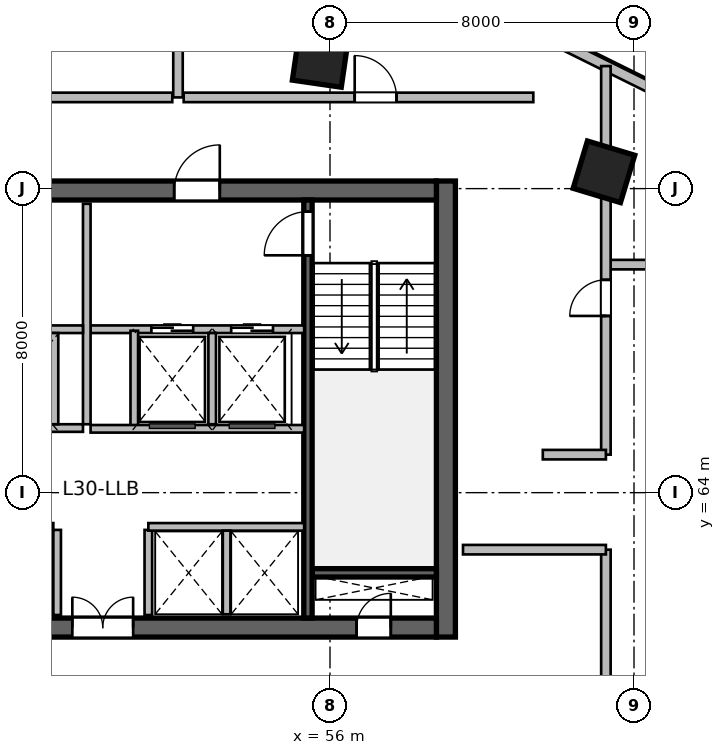
"""IFC4 building model, lengths in metres.
Left out: names, types, materials, properties, quantities, classifications, styles, units other than length and angle.
Written with IfcOpenShell. Run it as: python <this file> out.ifc"""

import sys

from ifc_helpers import new_model, si_unit, direction, frame, frame_2d, origin, origin_2d, place, context, subcontext, project, spatial, rectangle, extrude, source, transform, mapped, element, fill, save


model = new_model("IFC4")
c1 = context("Model", 3, precision=1e-05, world=origin(), true_north=direction((0.0, 1.0)))
c2 = subcontext(c1, "Body", "Model", "MODEL_VIEW")
j1 = project(units=[si_unit("LENGTHUNIT", "METRE"), si_unit("PLANEANGLEUNIT", "RADIAN")], contexts=[c1])
p1 = place(None, origin())
s1 = spatial("IfcSite", under=j1, at=p1, CompositionType="ELEMENT")
p2 = place(p1, origin())
s2 = spatial("IfcBuilding", under=s1, at=p2, CompositionType="ELEMENT")
p3 = place(p2, frame((0.0, 0.0, 127.2)))
s3 = spatial("IfcBuildingStorey", under=s2, at=p3, CompositionType="ELEMENT", Elevation=127.2)
m1 = source(origin(), c2, "Body", "SweptSolid", [
    extrude(rectangle(XDim=12.0, YDim=0.5, at=frame_2d((6.0, 0.0))), origin(), (0.0, 0.0, 1.0), 3.9),
])
p4 = place(p3, frame((59.05, 60.2, 0.0), z_axis=(0.0, 0.0, 1.0), x_axis=(0.0, 1.0, 0.0)))
e1 = element("IfcWall", 1, at=p4, inside=s3, PredefinedType="SHEAR", context=c2, shape_type="MappedRepresentation", body=[
    mapped(m1, transform((0.0, 0.0, 0.0), scale=1.0)),
])
m2 = source(origin(), c2, "Body", "SweptSolid", [
    extrude(rectangle(XDim=21.6, YDim=0.5, at=frame_2d((10.8, 0.0))), origin(), (0.0, 0.0, 1.0), 3.9),
])
p5 = place(p3, frame((37.2, 60.45, 0.0), z_axis=(0.0, 0.0, 1.0), x_axis=(1.0, 0.0, 0.0)))
e2 = element("IfcWall", 2, at=p5, inside=s3, PredefinedType="SHEAR", context=c2, shape_type="MappedRepresentation", body=[
    mapped(m2, transform((0.0, 0.0, 0.0), scale=1.0)),
])
p6 = place(p5, frame((1.1, 0.0, 0.0)))
e3 = element("IfcOpeningElement", 3, at=p6, cuts=e2, PredefinedType="OPENING", context=c2, shape_type="SweptSolid", body=[
    extrude(rectangle(XDim=1.15, YDim=2.15, at=frame_2d((0.575, 1.075))), frame((0.0, 0.26, 0.0), z_axis=(0.0, -1.0, 0.0), x_axis=(1.0, 0.0, 0.0)), (0.0, 0.0, 1.0), 0.52),
])
p7 = place(p5, frame((19.5, 0.0, 0.0)))
e4 = element("IfcOpeningElement", 4, at=p7, cuts=e2, PredefinedType="OPENING", context=c2, shape_type="SweptSolid", body=[
    extrude(rectangle(XDim=0.9, YDim=2.1, at=frame_2d((0.45, 1.05))), frame((0.0, 0.26, 0.0), z_axis=(0.0, -1.0, 0.0), x_axis=(1.0, 0.0, 0.0)), (0.0, 0.0, 1.0), 0.52),
])
p8 = place(p5, frame((12.02, 0.0, 0.0)))
e5 = element("IfcOpeningElement", 5, at=p8, cuts=e2, PredefinedType="OPENING", context=c2, shape_type="SweptSolid", body=[
    extrude(rectangle(XDim=1.6, YDim=2.15, at=frame_2d((0.8, 1.075))), frame((0.0, 0.26, 0.0), z_axis=(0.0, -1.0, 0.0), x_axis=(1.0, 0.0, 0.0)), (0.0, 0.0, 1.0), 0.52),
])
p9 = place(p3, frame((37.2, 71.95, 0.0), z_axis=(0.0, 0.0, 1.0), x_axis=(1.0, 0.0, 0.0)))
e6 = element("IfcWall", 6, at=p9, inside=s3, PredefinedType="SHEAR", context=c2, shape_type="MappedRepresentation", body=[
    mapped(m2, transform((0.0, 0.0, 0.0), scale=1.0)),
])
p10 = place(p9, frame((1.2, 0.0, 0.0)))
e7 = element("IfcOpeningElement", 7, at=p10, cuts=e6, PredefinedType="OPENING", context=c2, shape_type="SweptSolid", body=[
    extrude(rectangle(XDim=0.9, YDim=2.1, at=frame_2d((0.45, 1.05))), frame((0.0, 0.26, 0.0), z_axis=(0.0, -1.0, 0.0), x_axis=(1.0, 0.0, 0.0)), (0.0, 0.0, 1.0), 0.52),
])
p11 = place(p9, frame((14.7, 0.0, 0.0)))
e8 = element("IfcOpeningElement", 8, at=p11, cuts=e6, PredefinedType="OPENING", context=c2, shape_type="SweptSolid", body=[
    extrude(rectangle(XDim=1.2, YDim=2.15, at=frame_2d((0.6, 1.075))), frame((0.0, 0.26, 0.0), z_axis=(0.0, -1.0, 0.0), x_axis=(1.0, 0.0, 0.0)), (0.0, 0.0, 1.0), 0.52),
])
p12 = place(p9, frame((4.15, 0.0, 0.0)))
e9 = element("IfcOpeningElement", 9, at=p12, cuts=e6, PredefinedType="OPENING", context=c2, shape_type="SweptSolid", body=[
    extrude(rectangle(XDim=1.3, YDim=2.15, at=frame_2d((0.65, 1.075))), frame((0.0, 0.26, 0.0), z_axis=(0.0, -1.0, 0.0), x_axis=(1.0, 0.0, 0.0)), (0.0, 0.0, 1.0), 0.52),
])
p13 = place(p9, frame((7.1, 0.0, 0.0)))
e10 = element("IfcOpeningElement", 10, at=p13, cuts=e6, PredefinedType="OPENING", context=c2, shape_type="SweptSolid", body=[
    extrude(rectangle(XDim=0.9, YDim=2.1, at=frame_2d((0.45, 1.05))), frame((0.0, 0.26, 0.0), z_axis=(0.0, -1.0, 0.0), x_axis=(1.0, 0.0, 0.0)), (0.0, 0.0, 1.0), 0.52),
])
m3 = source(origin(), c2, "Body", "SweptSolid", [
    extrude(rectangle(XDim=3.27, YDim=0.22, at=frame_2d((1.635, 0.0))), origin(), (0.0, 0.0, 1.0), 3.9),
])
p14 = place(p3, frame((55.53, 61.89, 0.0), z_axis=(0.0, 0.0, 1.0), x_axis=(1.0, 0.0, 0.0)))
e11 = element("IfcWall", 11, at=p14, inside=s3, PredefinedType="SHEAR", context=c2, shape_type="MappedRepresentation", body=[
    mapped(m3, transform((0.0, 0.0, 0.0), scale=1.0)),
])
m4 = source(origin(), c2, "Body", "SweptSolid", [
    extrude(rectangle(XDim=11.0, YDim=0.22, at=frame_2d((5.5, 0.0))), origin(), (0.0, 0.0, 1.0), 3.9),
])
p15 = place(p3, frame((55.42, 60.7, 0.0), z_axis=(0.0, 0.0, 1.0), x_axis=(0.0, 1.0, 0.0)))
e12 = element("IfcWall", 12, at=p15, inside=s3, PredefinedType="SHEAR", context=c2, shape_type="MappedRepresentation", body=[
    mapped(m4, transform((0.0, 0.0, 0.0), scale=1.0)),
])
p16 = place(p15, frame((9.545, 0.0, 0.0)))
e13 = element("IfcOpeningElement", 13, at=p16, cuts=e12, PredefinedType="OPENING", context=c2, shape_type="SweptSolid", body=[
    extrude(rectangle(XDim=1.15, YDim=2.15, at=frame_2d((0.575, 1.075))), frame((0.0, 0.12, 0.0), z_axis=(0.0, -1.0, 0.0), x_axis=(1.0, 0.0, 0.0)), (0.0, 0.0, 1.0), 0.24),
])
m5 = source(origin(), c2, "Body", "SweptSolid", [
    extrude(rectangle(XDim=1.3, YDim=1.3, at=origin_2d()), origin(), (0.0, 0.0, 1.0), 3.9),
])
for number, where, z_axis, x_axis in (
    (14, (55.747, 75.404, 0.0), (0.0, 0.0, 1.0), (0.143, 0.99, 0.0)),
    (15, (63.209, 72.442, 0.0), (0.0, 0.0, 1.0), (0.289, 0.957, 0.0)),
):
    element("IfcColumn", number, at=place(p3, frame(where, z_axis=z_axis, x_axis=x_axis)), inside=s3, PredefinedType="COLUMN", context=c2, shape_type="MappedRepresentation", body=[
        mapped(m5, transform((0.0, 0.0, 0.0), scale=1.0)),
    ])
m6 = source(origin(), c2, "Body", "SweptSolid", [
    extrude(rectangle(XDim=4.506, YDim=0.28, at=frame_2d((2.253, 0.0))), origin(), (0.0, 0.0, 1.0), 3.65),
])
p17 = place(p3, frame((60.714, 76.497, 0.0), z_axis=(0.0, 0.0, 1.0), x_axis=(0.89597155075, -0.444111450254, 0.0)))
e16 = element("IfcWall", 16, at=p17, inside=s3, PredefinedType="SOLIDWALL", context=c2, shape_type="MappedRepresentation", body=[
    mapped(m6, transform((0.0, 0.0, 0.0), scale=1.0)),
])
m7 = source(origin(), c2, "Body", "SweptSolid", [
    extrude(rectangle(XDim=2.24, YDim=0.2, at=frame_2d((1.12, 0.0))), origin(), (0.0, 0.0, 1.0), 3.65),
])
for number, where, z_axis, x_axis in (
    (17, (48.82, 60.78, 0.0), (0.0, 0.0, 1.0), (0.0, 1.0, 0.0)),
    (18, (51.22, 60.78, 0.0), (0.0, 0.0, 1.0), (0.0, 1.0, 0.0)),
):
    element("IfcWall", number, at=place(p3, frame(where, z_axis=z_axis, x_axis=x_axis)), inside=s3, PredefinedType="SOLIDWALL", context=c2, shape_type="MappedRepresentation", body=[
        mapped(m7, transform((0.0, 0.0, 0.0), scale=1.0)),
    ])
m8 = source(origin(), c2, "Body", "SweptSolid", [
    extrude(rectangle(XDim=5.62, YDim=0.2, at=frame_2d((2.81, 0.0))), origin(), (0.0, 0.0, 1.0), 3.65),
])
p18 = place(p3, frame((49.7, 68.3, 0.0), z_axis=(0.0, 0.0, 1.0), x_axis=(1.0, 0.0, 0.0)))
e19 = element("IfcWall", 19, at=p18, inside=s3, PredefinedType="SOLIDWALL", context=c2, shape_type="MappedRepresentation", body=[
    mapped(m8, transform((0.0, 0.0, 0.0), scale=1.0)),
])
p19 = place(p18, frame((1.6, 0.0, 0.0)))
e20 = element("IfcOpeningElement", 20, at=p19, cuts=e19, PredefinedType="OPENING", context=c2, shape_type="SweptSolid", body=[
    extrude(rectangle(XDim=1.1, YDim=2.15, at=frame_2d((0.55, 1.075))), frame((0.0, 0.11, 0.0), z_axis=(0.0, -1.0, 0.0), x_axis=(1.0, 0.0, 0.0)), (0.0, 0.0, 1.0), 0.22),
])
p20 = place(p18, frame((3.7, 0.0, 0.0)))
e21 = element("IfcOpeningElement", 21, at=p20, cuts=e19, PredefinedType="OPENING", context=c2, shape_type="SweptSolid", body=[
    extrude(rectangle(XDim=1.1, YDim=2.15, at=frame_2d((0.55, 1.075))), frame((0.0, 0.11, 0.0), z_axis=(0.0, -1.0, 0.0), x_axis=(1.0, 0.0, 0.0)), (0.0, 0.0, 1.0), 0.22),
])
m9 = source(origin(), c2, "Body", "SweptSolid", [
    extrude(rectangle(XDim=5.8, YDim=0.2, at=frame_2d((2.9, 0.0))), origin(), (0.0, 0.0, 1.0), 3.65),
])
p21 = place(p3, frame((49.6, 65.8, 0.0), z_axis=(0.0, 0.0, 1.0), x_axis=(0.0, 1.0, 0.0)))
e22 = element("IfcWall", 22, at=p21, inside=s3, PredefinedType="SOLIDWALL", context=c2, shape_type="MappedRepresentation", body=[
    mapped(m9, transform((0.0, 0.0, 0.0), scale=1.0)),
])
m10 = source(origin(), c2, "Body", "SweptSolid", [
    extrude(rectangle(XDim=2.58, YDim=0.2, at=frame_2d((1.29, 0.0))), origin(), (0.0, 0.0, 1.0), 3.65),
])
p22 = place(p3, frame((50.85, 65.68, 0.0), z_axis=(0.0, 0.0, 1.0), x_axis=(0.0, 1.0, 0.0)))
e23 = element("IfcWall", 23, at=p22, inside=s3, PredefinedType="SOLIDWALL", context=c2, shape_type="MappedRepresentation", body=[
    mapped(m10, transform((0.0, 0.0, 0.0), scale=1.0)),
])
m11 = source(origin(), c2, "Body", "SweptSolid", [
    extrude(rectangle(XDim=2.4, YDim=0.2, at=frame_2d((1.2, 0.0))), origin(), (0.0, 0.0, 1.0), 3.65),
])
p23 = place(p3, frame((52.9, 65.8, 0.0), z_axis=(0.0, 0.0, 1.0), x_axis=(0.0, 1.0, 0.0)))
e24 = element("IfcWall", 24, at=p23, inside=s3, PredefinedType="SOLIDWALL", context=c2, shape_type="MappedRepresentation", body=[
    mapped(m11, transform((0.0, 0.0, 0.0), scale=1.0)),
])
p24 = place(p3, frame((49.7, 65.68, 0.0), z_axis=(0.0, 0.0, 1.0), x_axis=(1.0, 0.0, 0.0)))
e25 = element("IfcWall", 25, at=p24, inside=s3, PredefinedType="SOLIDWALL", context=c2, shape_type="MappedRepresentation", body=[
    mapped(m8, transform((0.0, 0.0, 0.0), scale=1.0)),
])
m12 = source(origin(), c2, "Body", "SweptSolid", [
    extrude(rectangle(XDim=8.8, YDim=0.2, at=frame_2d((4.4, 0.0))), origin(), (0.0, 0.0, 1.0), 3.65),
])
p25 = place(p3, frame((40.7, 68.3, 0.0), z_axis=(0.0, 0.0, 1.0), x_axis=(1.0, 0.0, 0.0)))
e26 = element("IfcWall", 26, at=p25, inside=s3, PredefinedType="SOLIDWALL", context=c2, shape_type="MappedRepresentation", body=[
    mapped(m12, transform((0.0, 0.0, 0.0), scale=1.0)),
])
m13 = source(origin(), c2, "Body", "SweptSolid", [
    extrude(rectangle(XDim=8.02, YDim=0.2, at=frame_2d((4.01, 0.0))), origin(), (0.0, 0.0, 1.0), 3.65),
])
p26 = place(p3, frame((40.7, 63.1, 0.0), z_axis=(0.0, 0.0, 1.0), x_axis=(1.0, 0.0, 0.0)))
e27 = element("IfcWall", 27, at=p26, inside=s3, PredefinedType="SOLIDWALL", context=c2, shape_type="MappedRepresentation", body=[
    mapped(m13, transform((0.0, 0.0, 0.0), scale=1.0)),
])
p27 = place(p26, frame((3.4, 0.0, 0.0)))
e28 = element("IfcOpeningElement", 28, at=p27, cuts=e27, PredefinedType="OPENING", context=c2, shape_type="SweptSolid", body=[
    extrude(rectangle(XDim=0.95, YDim=2.15, at=frame_2d((0.475, 1.075))), frame((0.0, 0.11, 0.0), z_axis=(0.0, -1.0, 0.0), x_axis=(1.0, 0.0, 0.0)), (0.0, 0.0, 1.0), 0.22),
])
m14 = source(origin(), c2, "Body", "SweptSolid", [
    extrude(rectangle(XDim=4.1, YDim=0.2, at=frame_2d((2.05, 0.0))), origin(), (0.0, 0.0, 1.0), 3.65),
])
p28 = place(p3, frame((51.22, 63.1, 0.0), z_axis=(0.0, 0.0, 1.0), x_axis=(1.0, 0.0, 0.0)))
e29 = element("IfcWall", 29, at=p28, inside=s3, PredefinedType="SOLIDWALL", context=c2, shape_type="MappedRepresentation", body=[
    mapped(m14, transform((0.0, 0.0, 0.0), scale=1.0)),
])
m15 = source(origin(), c2, "Body", "SweptSolid", [
    extrude(rectangle(XDim=2.2, YDim=0.2, at=frame_2d((1.1, 0.0))), origin(), (0.0, 0.0, 1.0), 3.65),
])
p29 = place(p3, frame((53.28, 60.8, 0.0), z_axis=(0.0, 0.0, 1.0), x_axis=(0.0, 1.0, 0.0)))
e30 = element("IfcWall", 30, at=p29, inside=s3, PredefinedType="SOLIDWALL", context=c2, shape_type="MappedRepresentation", body=[
    mapped(m15, transform((0.0, 0.0, 0.0), scale=1.0)),
])
p30 = place(p3, frame((40.7, 65.7, 0.0), z_axis=(0.0, 0.0, 1.0), x_axis=(1.0, 0.0, 0.0)))
e31 = element("IfcWall", 31, at=p30, inside=s3, PredefinedType="SOLIDWALL", context=c2, shape_type="MappedRepresentation", body=[
    mapped(m12, transform((0.0, 0.0, 0.0), scale=1.0)),
])
p31 = place(p30, frame((0.72, 0.0, 0.0)))
e32 = element("IfcOpeningElement", 32, at=p31, cuts=e31, PredefinedType="OPENING", context=c2, shape_type="SweptSolid", body=[
    extrude(rectangle(XDim=1.0, YDim=2.15, at=frame_2d((0.5, 1.075))), frame((0.0, 0.11, 0.0), z_axis=(0.0, -1.0, 0.0), x_axis=(1.0, 0.0, 0.0)), (0.0, 0.0, 1.0), 0.22),
])
p32 = place(p30, frame((2.62, 0.0, 0.0)))
e33 = element("IfcOpeningElement", 33, at=p32, cuts=e31, PredefinedType="OPENING", context=c2, shape_type="SweptSolid", body=[
    extrude(rectangle(XDim=1.0, YDim=2.15, at=frame_2d((0.5, 1.075))), frame((0.0, 0.11, 0.0), z_axis=(0.0, -1.0, 0.0), x_axis=(1.0, 0.0, 0.0)), (0.0, 0.0, 1.0), 0.22),
])
p33 = place(p30, frame((4.55, 0.0, 0.0)))
e34 = element("IfcOpeningElement", 34, at=p33, cuts=e31, PredefinedType="OPENING", context=c2, shape_type="SweptSolid", body=[
    extrude(rectangle(XDim=1.0, YDim=2.15, at=frame_2d((0.5, 1.075))), frame((0.0, 0.11, 0.0), z_axis=(0.0, -1.0, 0.0), x_axis=(1.0, 0.0, 0.0)), (0.0, 0.0, 1.0), 0.22),
])
p34 = place(p30, frame((6.55, 0.0, 0.0)))
e35 = element("IfcOpeningElement", 35, at=p34, cuts=e31, PredefinedType="OPENING", context=c2, shape_type="SweptSolid", body=[
    extrude(rectangle(XDim=1.0, YDim=2.15, at=frame_2d((0.5, 1.075))), frame((0.0, 0.11, 0.0), z_axis=(0.0, -1.0, 0.0), x_axis=(1.0, 0.0, 0.0)), (0.0, 0.0, 1.0), 0.22),
])
p35 = place(p3, frame((48.75, 65.8, 0.0), z_axis=(0.0, 0.0, 1.0), x_axis=(0.0, 1.0, 0.0)))
e36 = element("IfcWall", 36, at=p35, inside=s3, PredefinedType="SOLIDWALL", context=c2, shape_type="MappedRepresentation", body=[
    mapped(m11, transform((0.0, 0.0, 0.0), scale=1.0)),
])
m16 = source(origin(), c2, "Body", "SweptSolid", [
    extrude(rectangle(XDim=2.5, YDim=0.25, at=frame_2d((1.25, 0.0))), origin(), (0.0, 0.0, 1.0), 3.65),
])
p36 = place(p3, frame((63.3, 70.0, 0.0), z_axis=(0.0, 0.0, 1.0), x_axis=(1.0, 0.0, 0.0)))
e37 = element("IfcWall", 37, at=p36, inside=s3, PredefinedType="PARTITIONING", context=c2, shape_type="MappedRepresentation", body=[
    mapped(m16, transform((0.0, 0.0, 0.0), scale=1.0)),
])
m17 = source(origin(), c2, "Body", "SweptSolid", [
    extrude(rectangle(XDim=7.7, YDim=0.25, at=frame_2d((3.85, 0.0))), origin(), (0.0, 0.0, 1.0), 3.65),
])
p37 = place(p3, frame((44.15, 74.4, 0.0), z_axis=(0.0, 0.0, 1.0), x_axis=(1.0, 0.0, 0.0)))
e38 = element("IfcWall", 38, at=p37, inside=s3, PredefinedType="PARTITIONING", context=c2, shape_type="MappedRepresentation", body=[
    mapped(m17, transform((0.0, 0.0, 0.0), scale=1.0)),
])
p38 = place(p37, frame((3.3, 0.0, 0.0)))
e39 = element("IfcOpeningElement", 39, at=p38, cuts=e38, PredefinedType="OPENING", context=c2, shape_type="SweptSolid", body=[
    extrude(rectangle(XDim=1.1, YDim=2.15, at=frame_2d((0.55, 1.075))), frame((0.0, 0.135, 0.0), z_axis=(0.0, -1.0, 0.0), x_axis=(1.0, 0.0, 0.0)), (0.0, 0.0, 1.0), 0.27),
])
m18 = source(origin(), c2, "Body", "SweptSolid", [
    extrude(rectangle(XDim=4.423, YDim=0.25, at=frame_2d((2.211, 0.0))), origin(), (0.0, 0.0, 1.0), 3.65),
])
p39 = place(p3, frame((52.0, 74.4, 0.0), z_axis=(0.0, 0.0, 1.0), x_axis=(0.0, 1.0, 0.0)))
e40 = element("IfcWall", 40, at=p39, inside=s3, PredefinedType="PARTITIONING", context=c2, shape_type="MappedRepresentation", body=[
    mapped(m18, transform((0.0, 0.0, 0.0), scale=1.0)),
])
m19 = source(origin(), c2, "Body", "SweptSolid", [
    extrude(rectangle(XDim=9.2, YDim=0.25, at=frame_2d((4.6, 0.0))), origin(), (0.0, 0.0, 1.0), 3.022),
])
p40 = place(p3, frame((52.15, 74.4, 0.0), z_axis=(0.0, 0.0, 1.0), x_axis=(1.0, 0.0, 0.0)))
e41 = element("IfcWall", 41, at=p40, inside=s3, PredefinedType="PARTITIONING", context=c2, shape_type="MappedRepresentation", body=[
    mapped(m19, transform((0.0, 0.0, 0.0), scale=1.0)),
])
p41 = place(p40, frame((4.5, 0.0, 0.0)))
e42 = element("IfcOpeningElement", 42, at=p41, cuts=e41, PredefinedType="OPENING", context=c2, shape_type="SweptSolid", body=[
    extrude(rectangle(XDim=1.1, YDim=2.15, at=frame_2d((0.55, 1.075))), frame((0.0, 0.135, 0.0), z_axis=(0.0, -1.0, 0.0), x_axis=(1.0, 0.0, 0.0)), (0.0, 0.0, 1.0), 0.27),
])
m20 = source(origin(), c2, "Body", "SweptSolid", [
    extrude(rectangle(XDim=16.706, YDim=0.25, at=frame_2d((8.353, 0.0))), origin(), (0.0, 0.0, 1.0), 2.942),
])
p42 = place(p3, frame((63.26, 45.794, 0.0), z_axis=(0.0, 0.0, 1.0), x_axis=(0.0, 1.0, 0.0)))
e43 = element("IfcWall", 43, at=p42, inside=s3, PredefinedType="PARTITIONING", context=c2, shape_type="MappedRepresentation", body=[
    mapped(m20, transform((0.0, 0.0, 0.0), scale=1.0)),
])
p43 = place(p42, frame((7.878, 0.0, 0.0)))
e44 = element("IfcOpeningElement", 44, at=p43, cuts=e43, PredefinedType="OPENING", context=c2, shape_type="SweptSolid", body=[
    extrude(rectangle(XDim=0.95, YDim=2.1, at=frame_2d((0.475, 1.05))), frame((0.0, 0.135, 0.0), z_axis=(0.0, -1.0, 0.0), x_axis=(1.0, 0.0, 0.0)), (0.0, 0.0, 1.0), 0.27),
])
m21 = source(origin(), c2, "Body", "SweptSolid", [
    extrude(rectangle(XDim=3.76, YDim=0.25, at=frame_2d((1.88, 0.0))), origin(), (0.0, 0.0, 1.0), 3.65),
])
p44 = place(p3, frame((59.5, 62.5, 0.0), z_axis=(0.0, 0.0, 1.0), x_axis=(1.0, 0.0, 0.0)))
e45 = element("IfcWall", 45, at=p44, inside=s3, PredefinedType="PARTITIONING", context=c2, shape_type="MappedRepresentation", body=[
    mapped(m21, transform((0.0, 0.0, 0.0), scale=1.0)),
])
m22 = source(origin(), c2, "Body", "SweptSolid", [
    extrude(rectangle(XDim=10.224, YDim=0.25, at=frame_2d((5.112, 0.0))), origin(), (0.0, 0.0, 1.0), 3.65),
])
p45 = place(p3, frame((63.26, 65.0, 0.0), z_axis=(0.0, 0.0, 1.0), x_axis=(0.0, 1.0, 0.0)))
e46 = element("IfcWall", 46, at=p45, inside=s3, PredefinedType="PARTITIONING", context=c2, shape_type="MappedRepresentation", body=[
    mapped(m22, transform((0.0, 0.0, 0.0), scale=1.0)),
])
p46 = place(p45, frame((3.65, 0.0, 0.0)))
e47 = element("IfcOpeningElement", 47, at=p46, cuts=e46, PredefinedType="OPENING", context=c2, shape_type="SweptSolid", body=[
    extrude(rectangle(XDim=0.95, YDim=2.1, at=frame_2d((0.475, 1.05))), frame((0.0, 0.135, 0.0), z_axis=(0.0, -1.0, 0.0), x_axis=(1.0, 0.0, 0.0)), (0.0, 0.0, 1.0), 0.27),
])
m23 = source(origin(), c2, "Body", "SweptSolid", [
    extrude(rectangle(XDim=1.66, YDim=0.25, at=frame_2d((0.83, 0.0))), origin(), (0.0, 0.0, 1.0), 3.65),
])
p47 = place(p3, frame((61.6, 65.0, 0.0), z_axis=(0.0, 0.0, 1.0), x_axis=(1.0, 0.0, 0.0)))
e48 = element("IfcWall", 48, at=p47, inside=s3, PredefinedType="PARTITIONING", context=c2, shape_type="MappedRepresentation", body=[
    mapped(m23, transform((0.0, 0.0, 0.0), scale=1.0)),
])
m24 = source(origin(), c2, "Body", "SweptSolid", [
    extrude(rectangle(XDim=0.9, YDim=2.1, at=frame_2d((0.45, 1.05))), frame((0.0, 0.025, 0.0), z_axis=(0.0, -1.0, 0.0), x_axis=(1.0, 0.0, 0.0)), (0.0, 0.0, 1.0), 0.05),
])
p48 = place(p7, origin())
e49 = element("IfcDoor", 49, at=p48, inside=s3, OperationType="SINGLE_SWING_RIGHT", PredefinedType="DOOR", context=c2, shape_type="MappedRepresentation", body=[
    mapped(m24, transform((0.0, 0.0, 0.0), scale=1.0)),
])
fill(e4, e49)
m25 = source(origin(), c2, "Body", "SweptSolid", [
    extrude(rectangle(XDim=1.15, YDim=2.15, at=frame_2d((0.575, 1.075))), frame((0.0, 0.025, 0.0), z_axis=(0.0, -1.0, 0.0), x_axis=(1.0, 0.0, 0.0)), (0.0, 0.0, 1.0), 0.05),
])
p49 = place(p16, origin())
e50 = element("IfcDoor", 50, at=p49, inside=s3, OperationType="SINGLE_SWING_LEFT", PredefinedType="DOOR", context=c2, shape_type="MappedRepresentation", body=[
    mapped(m25, transform((0.0, 0.0, 0.0), scale=1.0)),
])
fill(e13, e50)
m26 = source(origin(), c2, "Body", "SweptSolid", [
    extrude(rectangle(XDim=1.6, YDim=2.15, at=frame_2d((0.8, 1.075))), frame((0.0, 0.025, 0.0), z_axis=(0.0, -1.0, 0.0), x_axis=(1.0, 0.0, 0.0)), (0.0, 0.0, 1.0), 0.05),
])
p50 = place(p8, origin())
e51 = element("IfcDoor", 51, at=p50, inside=s3, OperationType="DOUBLE_DOOR_SINGLE_SWING", PredefinedType="DOOR", context=c2, shape_type="MappedRepresentation", body=[
    mapped(m26, transform((0.0, 0.0, 0.0), scale=1.0)),
])
fill(e5, e51)
m27 = source(origin(), c2, "Body", "SweptSolid", [
    extrude(rectangle(XDim=1.2, YDim=2.15, at=frame_2d((0.6, 1.075))), frame((0.0, 0.025, 0.0), z_axis=(0.0, -1.0, 0.0), x_axis=(1.0, 0.0, 0.0)), (0.0, 0.0, 1.0), 0.05),
])
p51 = place(p11, origin())
e52 = element("IfcDoor", 52, at=p51, inside=s3, OperationType="SINGLE_SWING_RIGHT", PredefinedType="DOOR", context=c2, shape_type="MappedRepresentation", body=[
    mapped(m27, transform((0.0, 0.0, 0.0), scale=1.0)),
])
fill(e8, e52)
m28 = source(origin(), c2, "Body", "SweptSolid", [
    extrude(rectangle(XDim=1.1, YDim=2.15, at=frame_2d((0.55, 1.075))), frame((0.0, 0.025, 0.0), z_axis=(0.0, -1.0, 0.0), x_axis=(1.0, 0.0, 0.0)), (0.0, 0.0, 1.0), 0.05),
])
p52 = place(p19, origin())
e53 = element("IfcDoor", 53, at=p52, inside=s3, OperationType="DOUBLE_DOOR_SLIDING", PredefinedType="DOOR", context=c2, shape_type="MappedRepresentation", body=[
    mapped(m28, transform((0.0, 0.0, 0.0), scale=1.0)),
])
fill(e20, e53)
p53 = place(p20, origin())
e54 = element("IfcDoor", 54, at=p53, inside=s3, OperationType="DOUBLE_DOOR_SLIDING", PredefinedType="DOOR", context=c2, shape_type="MappedRepresentation", body=[
    mapped(m28, transform((0.0, 0.0, 0.0), scale=1.0)),
])
fill(e21, e54)
m29 = source(origin(), c2, "Body", "SweptSolid", [
    extrude(rectangle(XDim=1.1, YDim=2.15, at=frame_2d((0.55, 1.075))), frame((0.0, 0.025, 0.0), z_axis=(0.0, -1.0, 0.0), x_axis=(1.0, 0.0, 0.0)), (0.0, 0.0, 1.0), 0.05),
])
p54 = place(p41, origin())
e55 = element("IfcDoor", 55, at=p54, inside=s3, OperationType="SINGLE_SWING_LEFT", PredefinedType="DOOR", context=c2, shape_type="MappedRepresentation", body=[
    mapped(m29, transform((0.0, 0.0, 0.0), scale=1.0)),
])
fill(e42, e55)
m30 = source(origin(), c2, "Body", "SweptSolid", [
    extrude(rectangle(XDim=0.95, YDim=2.1, at=frame_2d((0.475, 1.05))), frame((0.0, 0.025, 0.0), z_axis=(0.0, -1.0, 0.0), x_axis=(1.0, 0.0, 0.0)), (0.0, 0.0, 1.0), 0.05),
])
p55 = place(p46, origin())
e56 = element("IfcDoor", 56, at=p55, inside=s3, OperationType="SINGLE_SWING_LEFT", PredefinedType="DOOR", context=c2, shape_type="MappedRepresentation", body=[
    mapped(m30, transform((0.0, 0.0, 0.0), scale=1.0)),
])
fill(e47, e56)
save(model, sys.argv[1])
